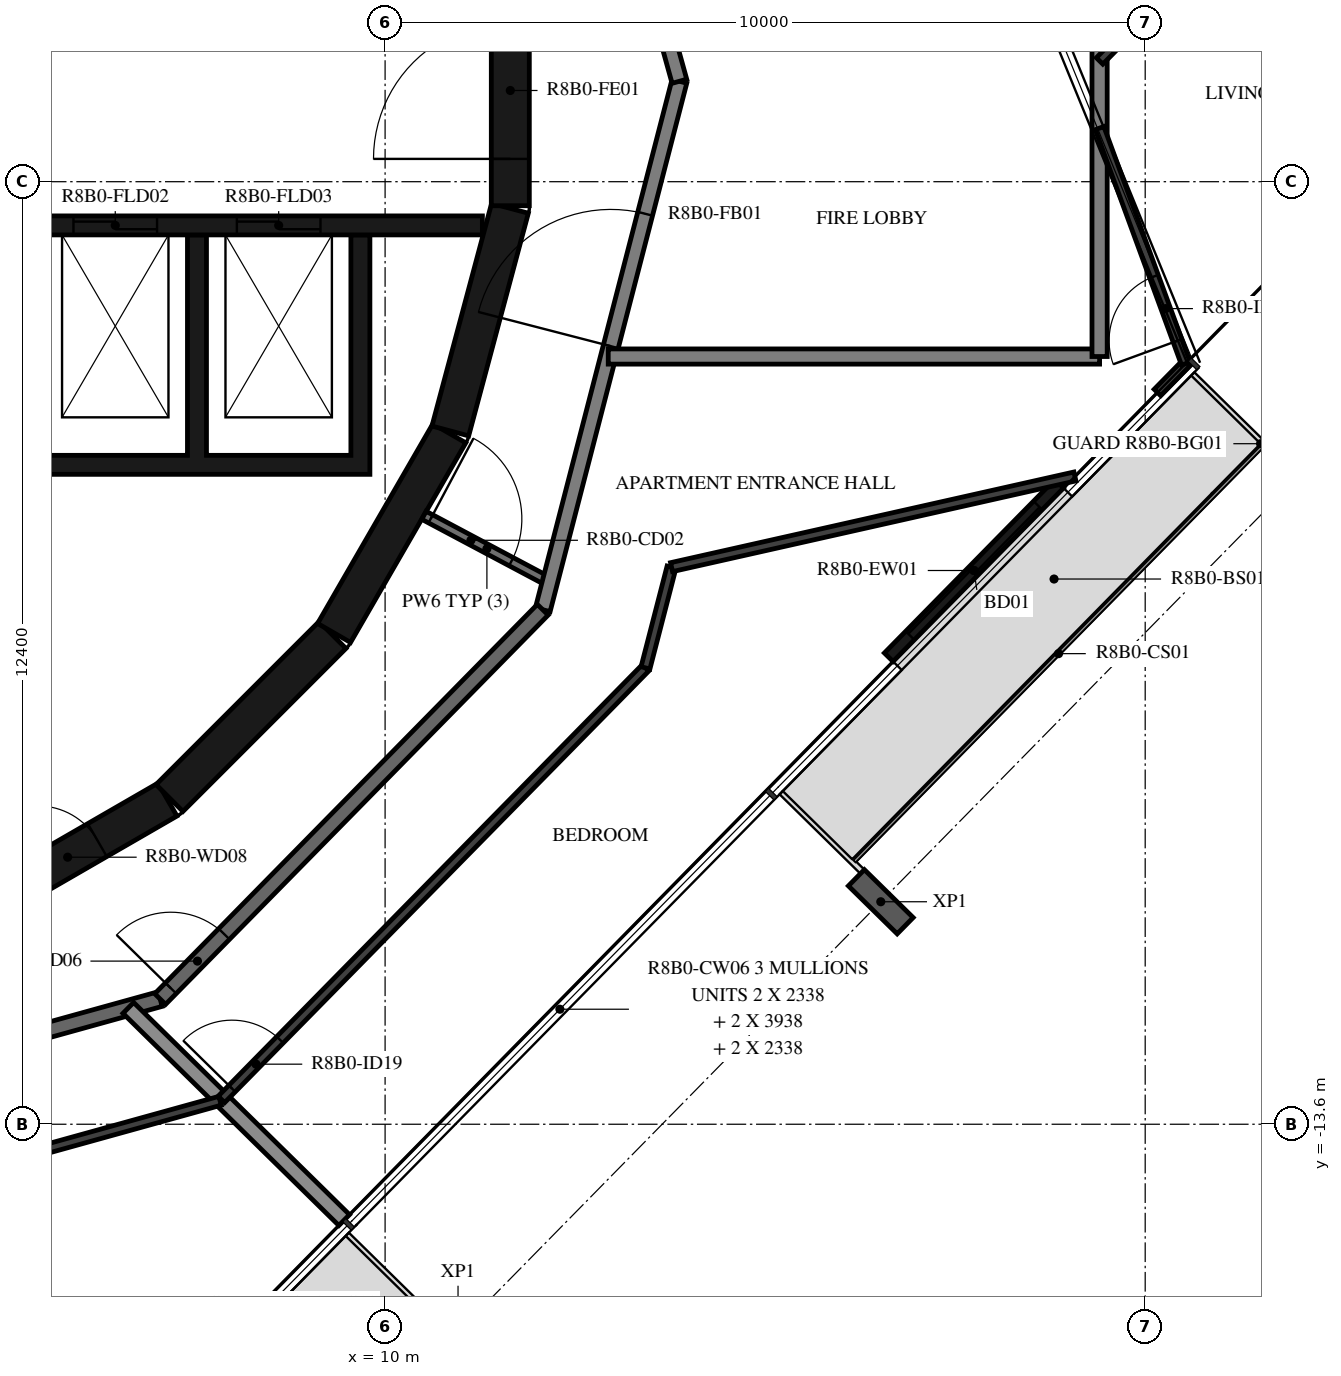
"""IFC4 building model, lengths in metres.
Left out: names, types, materials, properties, quantities, classifications, styles, units other than length and angle.
Written with IfcOpenShell. Run it as: python <this file> out.ifc"""

import sys

from ifc_helpers import new_model, si_unit, direction, frame, frame_2d, origin, origin_2d, place, context, subcontext, project, spatial, polyline, rectangle, i_section, outline, extrude, element, fill, save


model = new_model("IFC4")
c1 = context("Model", 3, precision=1e-05, world=origin(), true_north=direction((0.0, 1.0)))
c2 = subcontext(c1, "Body", "Model", "MODEL_VIEW")
j1 = project(units=[si_unit("LENGTHUNIT", "METRE"), si_unit("PLANEANGLEUNIT", "RADIAN")], contexts=[c1])
p1 = place(None, origin())
s1 = spatial("IfcSite", under=j1, at=p1, CompositionType="ELEMENT")
p2 = place(p1, origin())
s2 = spatial("IfcBuilding", under=s1, at=p2, CompositionType="ELEMENT")
p3 = place(p2, frame((0.0, 0.0, 312.2)))
s3 = spatial("IfcBuildingStorey", under=s2, at=p3, CompositionType="ELEMENT", Elevation=312.2)
p4 = place(p3, frame((16.521, -10.673, -0.38), z_axis=(0.0, 0.0, 1.0), x_axis=(-0.70090935439, -0.713250360623, 0.0)))
e1 = element("IfcColumn", 1, at=p4, inside=s3, PredefinedType="COLUMN", context=c2, shape_type="SweptSolid", body=[
    extrude(i_section(OverallWidth=0.3, OverallDepth=0.9, WebThickness=0.019, FlangeThickness=0.035, FilletRadius=0.03, at=origin_2d()), origin(), (0.0, 0.0, 1.0), 3.5),
])
p5 = place(p3, frame((16.626, -7.456, 0.0), z_axis=(0.0, 0.0, 1.0), x_axis=(0.700900076932, 0.713259477439, 0.0)))
e2 = element("IfcWall", 2, at=p5, inside=s3, PredefinedType="STANDARD", context=c2, shape_type="SweptSolid", body=[
    extrude(rectangle(XDim=3.2, YDim=0.16, at=frame_2d((1.6, 0.0))), origin(), (0.0, 0.0, 1.0), 3.12),
])
p6 = place(p5, frame((0.4, 0.0, 0.0)))
e3 = element("IfcOpeningElement", 3, at=p6, cuts=e2, PredefinedType="OPENING", context=c2, shape_type="SweptSolid", body=[
    extrude(rectangle(XDim=2.4, YDim=2.4, at=frame_2d((1.2, 1.2))), frame((0.0, 0.09, 0.0), z_axis=(0.0, -1.0, 0.0), x_axis=(1.0, 0.0, 0.0)), (0.0, 0.0, 1.0), 0.18),
])
p7 = place(p3, frame((4.51, -10.845, 0.0), z_axis=(0.0, 0.0, 1.0), x_axis=(0.865975092491, 0.500087131594, 0.0)))
e4 = element("IfcWall", 4, at=p7, inside=s3, PredefinedType="SHEAR", context=c2, shape_type="SweptSolid", body=[
    extrude(rectangle(XDim=3.033, YDim=0.5, at=frame_2d((1.516, 0.0))), origin(), (0.0, 0.0, 1.0), 3.12),
])
p8 = place(p7, frame((1.066, 0.0, 0.0)))
e5 = element("IfcOpeningElement", 5, at=p8, cuts=e4, PredefinedType="OPENING", context=c2, shape_type="SweptSolid", body=[
    extrude(rectangle(XDim=0.9, YDim=2.1, at=frame_2d((0.45, 1.05))), frame((0.0, 0.26, 0.0), z_axis=(0.0, -1.0, 0.0), x_axis=(1.0, 0.0, 0.0)), (0.0, 0.0, 1.0), 0.52),
])
p9 = place(p3, frame((7.164, -9.308, 0.0), z_axis=(0.0, 0.0, 1.0), x_axis=(0.707106781187, 0.707106781187, 0.0)))
e6 = element("IfcWall", 6, at=p9, inside=s3, PredefinedType="SHEAR", context=c2, shape_type="SweptSolid", body=[
    extrude(rectangle(XDim=3.032, YDim=0.5, at=frame_2d((1.516, 0.0))), origin(), (0.0, 0.0, 1.0), 3.12),
])
for number, where, z_axis, x_axis in (
    (7, (9.329, -7.137, 0.0), (0.0, 0.0, 1.0), (0.5, 0.866, 0.0)),
    (8, (10.858, -4.479, 0.0), (0.0, 0.0, 1.0), (0.259, 0.966, 0.0)),
):
    element("IfcWall", number, at=place(p3, frame(where, z_axis=z_axis, x_axis=x_axis)), inside=s3, PredefinedType="SHEAR", context=c2, shape_type="SweptSolid", body=[
        extrude(rectangle(XDim=3.033, YDim=0.5, at=frame_2d((1.516, 0.0))), origin(), (0.0, 0.0, 1.0), 3.12),
    ])
p10 = place(p3, frame((11.647, -1.516, 0.0), z_axis=(0.0, 0.0, 1.0), x_axis=(0.0, 1.0, 0.0)))
e9 = element("IfcWall", 9, at=p10, inside=s3, PredefinedType="SHEAR", context=c2, shape_type="SweptSolid", body=[
    extrude(rectangle(XDim=3.033, YDim=0.5, at=frame_2d((1.516, 0.0))), origin(), (0.0, 0.0, 1.0), 3.12),
])
p11 = place(p10, frame((0.616, 0.0, 0.0)))
e10 = element("IfcOpeningElement", 10, at=p11, cuts=e9, PredefinedType="OPENING", context=c2, shape_type="SweptSolid", body=[
    extrude(rectangle(XDim=1.8, YDim=2.1, at=frame_2d((0.9, 1.05))), frame((0.0, 0.26, 0.0), z_axis=(0.0, -1.0, 0.0), x_axis=(1.0, 0.0, 0.0)), (0.0, 0.0, 1.0), 0.52),
])
p12 = place(p3, origin())
e11 = element("IfcWall", 11, at=p12, inside=s3, PredefinedType="SHEAR", context=c2, shape_type="SweptSolid", body=[
    extrude(outline(polyline([(9.8, -5.05), (9.8, -4.8), (9.8, -1.9), (9.55, -1.9), (9.55, -4.8), (7.65, -4.8), (7.65, -1.9), (7.4, -1.9), (7.4, -4.8), (5.5, -4.8), (5.5, -1.9), (5.25, -1.9), (5.25, -4.8), (3.35, -4.8), (3.35, -1.9), (3.1, -1.9), (3.1, -4.8), (1.2, -4.8), (1.2, -1.9), (0.95, -1.9), (0.95, -4.8), (-0.95, -4.8), (-0.95, -1.9), (-1.2, -1.9), (-1.2, -4.8), (-3.1, -4.8), (-3.1, -1.9), (-3.35, -1.9), (-3.35, -4.8), (-5.25, -4.8), (-5.25, -1.9), (-5.5, -1.9), (-5.5, -4.8), (-9.55, -4.8), (-9.55, -1.9), (-9.8, -1.9), (-9.8, -4.8), (-9.8, -5.05), (9.8, -5.05)])), origin(), (0.0, 0.0, 1.0), 3.12),
])
p13 = place(p3, frame((3.35, -1.775, 0.0), z_axis=(0.0, 0.0, 1.0), x_axis=(1.0, 0.0, 0.0)))
e12 = element("IfcWall", 12, at=p13, inside=s3, PredefinedType="SHEAR", context=c2, shape_type="SweptSolid", body=[
    extrude(rectangle(XDim=7.93, YDim=0.25, at=frame_2d((3.965, 0.0))), origin(), (0.0, 0.0, 1.0), 3.12),
])
p14 = place(p13, frame((0.4, 0.0, 0.0)))
e13 = element("IfcOpeningElement", 13, at=p14, cuts=e12, PredefinedType="OPENING", context=c2, shape_type="SweptSolid", body=[
    extrude(rectangle(XDim=1.1, YDim=2.4, at=frame_2d((0.55, 1.2))), frame((0.0, 0.135, 0.0), z_axis=(0.0, -1.0, 0.0), x_axis=(1.0, 0.0, 0.0)), (0.0, 0.0, 1.0), 0.27),
])
p15 = place(p13, frame((2.55, 0.0, 0.0)))
e14 = element("IfcOpeningElement", 14, at=p15, cuts=e12, PredefinedType="OPENING", context=c2, shape_type="SweptSolid", body=[
    extrude(rectangle(XDim=1.1, YDim=2.4, at=frame_2d((0.55, 1.2))), frame((0.0, 0.135, 0.0), z_axis=(0.0, -1.0, 0.0), x_axis=(1.0, 0.0, 0.0)), (0.0, 0.0, 1.0), 0.27),
])
p16 = place(p13, frame((4.7, 0.0, 0.0)))
e15 = element("IfcOpeningElement", 15, at=p16, cuts=e12, PredefinedType="OPENING", context=c2, shape_type="SweptSolid", body=[
    extrude(rectangle(XDim=1.1, YDim=2.4, at=frame_2d((0.55, 1.2))), frame((0.0, 0.135, 0.0), z_axis=(0.0, -1.0, 0.0), x_axis=(1.0, 0.0, 0.0)), (0.0, 0.0, 1.0), 0.27),
])
p17 = place(p3, frame((10.511, -5.589, 0.0), z_axis=(0.0, 0.0, 1.0), x_axis=(0.882957311919, -0.469453283437, 0.0)))
e16 = element("IfcWall", 16, at=p17, inside=s3, PredefinedType="PARTITIONING", context=c2, shape_type="SweptSolid", body=[
    extrude(rectangle(XDim=1.876, YDim=0.12, at=frame_2d((0.938, 0.0))), origin(), (0.0, 0.0, 1.0), 3.12),
])
p18 = place(p17, frame((0.1, 0.0, 0.0)))
e17 = element("IfcOpeningElement", 17, at=p18, cuts=e16, PredefinedType="OPENING", context=c2, shape_type="SweptSolid", body=[
    extrude(rectangle(XDim=1.2, YDim=2.1, at=frame_2d((0.6, 1.05))), frame((0.0, 0.07, 0.0), z_axis=(0.0, -1.0, 0.0), x_axis=(1.0, 0.0, 0.0)), (0.0, 0.0, 1.0), 0.14),
])
p19 = place(p3, frame((12.074, -6.831, 0.0), z_axis=(0.0, 0.0, 1.0), x_axis=(0.250391063186, 0.968144780225, 0.0)))
e18 = element("IfcWall", 18, at=p19, inside=s3, PredefinedType="STANDARD", context=c2, shape_type="SweptSolid", body=[
    extrude(rectangle(XDim=7.181, YDim=0.2, at=frame_2d((3.591, 0.0))), origin(), (0.0, 0.0, 1.0), 3.12),
])
p20 = place(p19, frame((3.581, 0.0, 0.0)))
e19 = element("IfcOpeningElement", 19, at=p20, cuts=e18, PredefinedType="OPENING", context=c2, shape_type="SweptSolid", body=[
    extrude(rectangle(XDim=1.8, YDim=2.1, at=frame_2d((0.9, 1.05))), frame((0.0, 0.11, 0.0), z_axis=(0.0, -1.0, 0.0), x_axis=(1.0, 0.0, 0.0)), (0.0, 0.0, 1.0), 0.22),
])
p21 = place(p3, frame((13.872, 0.121, 0.0), z_axis=(0.0, 0.0, 1.0), x_axis=(-0.267291928416, 0.963615600228, 0.0)))
e20 = element("IfcWall", 20, at=p21, inside=s3, PredefinedType="STANDARD", context=c2, shape_type="SweptSolid", body=[
    extrude(rectangle(XDim=3.507, YDim=0.2, at=frame_2d((1.753, 0.0))), origin(), (0.0, 0.0, 1.0), 3.12),
])
p22 = place(p3, frame((0.121, -13.872, 0.0), z_axis=(0.0, 0.0, 1.0), x_axis=(0.963625960674, 0.267254575108, 0.0)))
e21 = element("IfcWall", 21, at=p22, inside=s3, PredefinedType="STANDARD", context=c2, shape_type="SweptSolid", body=[
    extrude(rectangle(XDim=7.181, YDim=0.2, at=frame_2d((3.591, 0.0))), origin(), (0.0, 0.0, 1.0), 3.12),
])
p23 = place(p3, frame((7.041, -11.953, 0.0), z_axis=(0.0, 0.0, 1.0), x_axis=(0.70090916255, 0.713250549143, 0.0)))
e22 = element("IfcWall", 22, at=p23, inside=s3, PredefinedType="STANDARD", context=c2, shape_type="SweptSolid", body=[
    extrude(rectangle(XDim=7.181, YDim=0.2, at=frame_2d((3.59, 0.0))), origin(), (0.0, 0.0, 1.0), 3.12),
])
p24 = place(p23, frame((0.2, 0.0, 0.0)))
e23 = element("IfcOpeningElement", 23, at=p24, cuts=e22, PredefinedType="OPENING", context=c2, shape_type="SweptSolid", body=[
    extrude(rectangle(XDim=1.0, YDim=2.1, at=frame_2d((0.5, 1.05))), frame((0.0, 0.11, 0.0), z_axis=(0.0, -1.0, 0.0), x_axis=(1.0, 0.0, 0.0)), (0.0, 0.0, 1.0), 0.22),
])
p25 = place(p3, frame((12.936, -3.5, 0.0), z_axis=(0.0, 0.0, 1.0), x_axis=(1.0, 0.0, 0.0)))
e24 = element("IfcWall", 24, at=p25, inside=s3, PredefinedType="STANDARD", context=c2, shape_type="SweptSolid", body=[
    extrude(rectangle(XDim=6.464, YDim=0.2, at=frame_2d((3.232, 0.0))), origin(), (0.0, 0.0, 1.0), 3.12),
])
p26 = place(p3, frame((19.4, -3.5, 0.0), z_axis=(0.0, 0.0, 1.0), x_axis=(0.0, 1.0, 0.0)))
e25 = element("IfcWall", 25, at=p26, inside=s3, PredefinedType="STANDARD", context=c2, shape_type="SweptSolid", body=[
    extrude(rectangle(XDim=6.954, YDim=0.2, at=frame_2d((3.477, 0.0))), origin(), (0.0, 0.0, 1.0), 3.12),
])
p27 = place(p3, frame((9.462, -14.861, 0.0), z_axis=(0.0, 0.0, 1.0), x_axis=(-0.713302018318, 0.700856783276, 0.0)))
e26 = element("IfcWall", 26, at=p27, inside=s3, PredefinedType="STANDARD", context=c2, shape_type="SweptSolid", body=[
    extrude(rectangle(XDim=3.982, YDim=0.2, at=frame_2d((1.991, 0.0))), origin(), (0.0, 0.0, 1.0), 2.73),
])
p28 = place(p3, frame((0.135, -15.425, 0.0), z_axis=(0.0, 0.0, 1.0), x_axis=(0.963633899075, 0.267225950373, 0.0)))
e27 = element("IfcWall", 27, at=p28, inside=s3, PredefinedType="PARTITIONING", context=c2, shape_type="SweptSolid", body=[
    extrude(rectangle(XDim=7.985, YDim=0.12, at=frame_2d((3.992, 0.0))), origin(), (0.0, 0.0, 1.0), 3.12),
])
p29 = place(p28, frame((0.714, 0.0, 0.0)))
e28 = element("IfcOpeningElement", 28, at=p29, cuts=e27, PredefinedType="OPENING", context=c2, shape_type="SweptSolid", body=[
    extrude(rectangle(XDim=0.9, YDim=2.1, at=frame_2d((0.45, 1.05))), frame((0.0, 0.07, 0.0), z_axis=(0.0, -1.0, 0.0), x_axis=(1.0, 0.0, 0.0)), (0.0, 0.0, 1.0), 0.14),
])
p30 = place(p28, frame((2.467, 0.0, 0.0)))
e29 = element("IfcOpeningElement", 29, at=p30, cuts=e27, PredefinedType="OPENING", context=c2, shape_type="SweptSolid", body=[
    extrude(rectangle(XDim=0.9, YDim=2.1, at=frame_2d((0.45, 1.05))), frame((0.0, 0.07, 0.0), z_axis=(0.0, -1.0, 0.0), x_axis=(1.0, 0.0, 0.0)), (0.0, 0.0, 1.0), 0.14),
])
p31 = place(p3, frame((20.566, -3.561, 0.0), z_axis=(0.0, 0.0, 1.0), x_axis=(-0.700950066256, -0.713210350889, 0.0)))
e30 = element("IfcWall", 30, at=p31, inside=s3, PredefinedType="PARTITIONING", context=c2, shape_type="SweptSolid", body=[
    extrude(rectangle(XDim=0.577, YDim=0.12, at=frame_2d((0.289, 0.0))), origin(), (0.0, 0.0, 1.0), 3.12),
])
p32 = place(p3, frame((20.535, -3.593, 0.0), z_axis=(0.0, 0.0, 1.0), x_axis=(-0.344065452993, 0.93894566619, 0.0)))
e31 = element("IfcWall", 31, at=p32, inside=s3, PredefinedType="PARTITIONING", context=c2, shape_type="SweptSolid", body=[
    extrude(rectangle(XDim=3.299, YDim=0.12, at=frame_2d((1.649, 0.0))), origin(), (0.0, 0.0, 1.0), 3.12),
])
p33 = place(p32, frame((0.32, 0.0, 0.0)))
e32 = element("IfcOpeningElement", 32, at=p33, cuts=e31, PredefinedType="OPENING", context=c2, shape_type="SweptSolid", body=[
    extrude(rectangle(XDim=0.9, YDim=2.1, at=frame_2d((0.45, 1.05))), frame((0.0, 0.07, 0.0), z_axis=(0.0, -1.0, 0.0), x_axis=(1.0, 0.0, 0.0)), (0.0, 0.0, 1.0), 0.14),
])
p34 = place(p3, frame((7.846, -13.273, 0.0), z_axis=(0.0, 0.0, 1.0), x_axis=(0.700915117659, 0.713244697027, 0.0)))
e33 = element("IfcWall", 33, at=p34, inside=s3, PredefinedType="PARTITIONING", context=c2, shape_type="SweptSolid", body=[
    extrude(rectangle(XDim=7.96, YDim=0.12, at=frame_2d((3.98, 0.0))), origin(), (0.0, 0.0, 1.0), 3.12),
])
p35 = place(p34, frame((0.2, 0.0, 0.0)))
e34 = element("IfcOpeningElement", 34, at=p35, cuts=e33, PredefinedType="OPENING", context=c2, shape_type="SweptSolid", body=[
    extrude(rectangle(XDim=0.9, YDim=2.1, at=frame_2d((0.45, 1.05))), frame((0.0, 0.07, 0.0), z_axis=(0.0, -1.0, 0.0), x_axis=(1.0, 0.0, 0.0)), (0.0, 0.0, 1.0), 0.14),
])
p36 = place(p3, frame((13.426, -7.596, 0.0), z_axis=(0.0, 0.0, 1.0), x_axis=(0.250417410425, 0.968137965662, 0.0)))
e35 = element("IfcWall", 35, at=p36, inside=s3, PredefinedType="PARTITIONING", context=c2, shape_type="SweptSolid", body=[
    extrude(rectangle(XDim=1.369, YDim=0.12, at=frame_2d((0.685, 0.0))), origin(), (0.0, 0.0, 1.0), 3.12),
])
p37 = place(p3, frame((13.769, -6.271, 0.0), z_axis=(0.0, 0.0, 1.0), x_axis=(0.975656114164, 0.219306057589, 0.0)))
e36 = element("IfcWall", 36, at=p37, inside=s3, PredefinedType="PARTITIONING", context=c2, shape_type="SweptSolid", body=[
    extrude(rectangle(XDim=5.439, YDim=0.12, at=frame_2d((2.72, 0.0))), origin(), (0.0, 0.0, 1.0), 3.12),
])
p38 = place(p3, frame((20.654, 1.665, 0.0), z_axis=(0.0, 0.0, 1.0), x_axis=(-0.700870484553, -0.713288555833, 0.0)))
e37 = element("IfcWall", 37, at=p38, inside=s3, PredefinedType="PARTITIONING", context=c2, shape_type="SweptSolid", body=[
    extrude(rectangle(XDim=1.789, YDim=0.12, at=frame_2d((0.895, 0.0))), origin(), (0.0, 0.0, 1.0), 3.12),
])
p39 = place(p6, origin())
e38 = element("IfcDoor", 38, at=p39, inside=s3, OperationType="DOUBLE_DOOR_SLIDING", PredefinedType="DOOR", context=c2, shape_type="SweptSolid", body=[
    extrude(rectangle(XDim=2.4, YDim=2.4, at=frame_2d((1.2, 1.2))), frame((0.0, 0.025, 0.0), z_axis=(0.0, -1.0, 0.0), x_axis=(1.0, 0.0, 0.0)), (0.0, 0.0, 1.0), 0.05),
])
fill(e3, e38)
p40 = place(p11, origin())
e39 = element("IfcDoor", 39, at=p40, inside=s3, OperationType="DOUBLE_DOOR_SINGLE_SWING", PredefinedType="DOOR", context=c2, shape_type="SweptSolid", body=[
    extrude(rectangle(XDim=1.8, YDim=2.1, at=frame_2d((0.9, 1.05))), frame((0.0, 0.025, 0.0), z_axis=(0.0, -1.0, 0.0), x_axis=(1.0, 0.0, 0.0)), (0.0, 0.0, 1.0), 0.05),
])
fill(e10, e39)
p41 = place(p15, origin())
e40 = element("IfcDoor", 40, at=p41, inside=s3, OperationType="DOUBLE_DOOR_SLIDING", PredefinedType="DOOR", context=c2, shape_type="SweptSolid", body=[
    extrude(rectangle(XDim=1.1, YDim=2.4, at=frame_2d((0.55, 1.2))), frame((0.0, 0.025, 0.0), z_axis=(0.0, -1.0, 0.0), x_axis=(1.0, 0.0, 0.0)), (0.0, 0.0, 1.0), 0.05),
])
fill(e14, e40)
p42 = place(p16, origin())
e41 = element("IfcDoor", 41, at=p42, inside=s3, OperationType="DOUBLE_DOOR_SLIDING", PredefinedType="DOOR", context=c2, shape_type="SweptSolid", body=[
    extrude(rectangle(XDim=1.1, YDim=2.4, at=frame_2d((0.55, 1.2))), frame((0.0, 0.025, 0.0), z_axis=(0.0, -1.0, 0.0), x_axis=(1.0, 0.0, 0.0)), (0.0, 0.0, 1.0), 0.05),
])
fill(e15, e41)
p43 = place(p8, origin())
e42 = element("IfcDoor", 42, at=p43, inside=s3, OperationType="SINGLE_SWING_RIGHT", PredefinedType="DOOR", context=c2, shape_type="SweptSolid", body=[
    extrude(rectangle(XDim=0.9, YDim=2.1, at=frame_2d((0.45, 1.05))), frame((0.0, 0.025, 0.0), z_axis=(0.0, -1.0, 0.0), x_axis=(1.0, 0.0, 0.0)), (0.0, 0.0, 1.0), 0.05),
])
fill(e5, e42)
p44 = place(p24, origin())
e43 = element("IfcDoor", 43, at=p44, inside=s3, OperationType="SINGLE_SWING_LEFT", PredefinedType="DOOR", context=c2, shape_type="SweptSolid", body=[
    extrude(rectangle(XDim=1.0, YDim=2.1, at=frame_2d((0.5, 1.05))), frame((0.0, 0.025, 0.0), z_axis=(0.0, -1.0, 0.0), x_axis=(1.0, 0.0, 0.0)), (0.0, 0.0, 1.0), 0.05),
])
fill(e23, e43)
p45 = place(p33, origin())
e44 = element("IfcDoor", 44, at=p45, inside=s3, OperationType="SINGLE_SWING_RIGHT", PredefinedType="DOOR", context=c2, shape_type="SweptSolid", body=[
    extrude(rectangle(XDim=0.9, YDim=2.1, at=frame_2d((0.45, 1.05))), frame((0.0, 0.025, 0.0), z_axis=(0.0, -1.0, 0.0), x_axis=(1.0, 0.0, 0.0)), (0.0, 0.0, 1.0), 0.05),
])
fill(e32, e44)
p46 = place(p35, origin())
e45 = element("IfcDoor", 45, at=p46, inside=s3, OperationType="SINGLE_SWING_LEFT", PredefinedType="DOOR", context=c2, shape_type="SweptSolid", body=[
    extrude(rectangle(XDim=0.9, YDim=2.1, at=frame_2d((0.45, 1.05))), frame((0.0, 0.025, 0.0), z_axis=(0.0, -1.0, 0.0), x_axis=(1.0, 0.0, 0.0)), (0.0, 0.0, 1.0), 0.05),
])
fill(e34, e45)
p47 = place(p18, origin())
e46 = element("IfcDoor", 46, at=p47, inside=s3, OperationType="DOUBLE_DOOR_SINGLE_SWING", PredefinedType="DOOR", context=c2, shape_type="SweptSolid", body=[
    extrude(rectangle(XDim=1.2, YDim=2.1, at=frame_2d((0.6, 1.05))), frame((0.0, 0.025, 0.0), z_axis=(0.0, -1.0, 0.0), x_axis=(1.0, 0.0, 0.0)), (0.0, 0.0, 1.0), 0.05),
])
fill(e17, e46)
p48 = place(p20, origin())
e47 = element("IfcDoor", 47, at=p48, inside=s3, OperationType="DOUBLE_DOOR_SINGLE_SWING", PredefinedType="DOOR", context=c2, shape_type="SweptSolid", body=[
    extrude(rectangle(XDim=1.8, YDim=2.1, at=frame_2d((0.9, 1.05))), frame((0.0, 0.025, 0.0), z_axis=(0.0, -1.0, 0.0), x_axis=(1.0, 0.0, 0.0)), (0.0, 0.0, 1.0), 0.05),
])
fill(e19, e47)
save(model, sys.argv[1])
